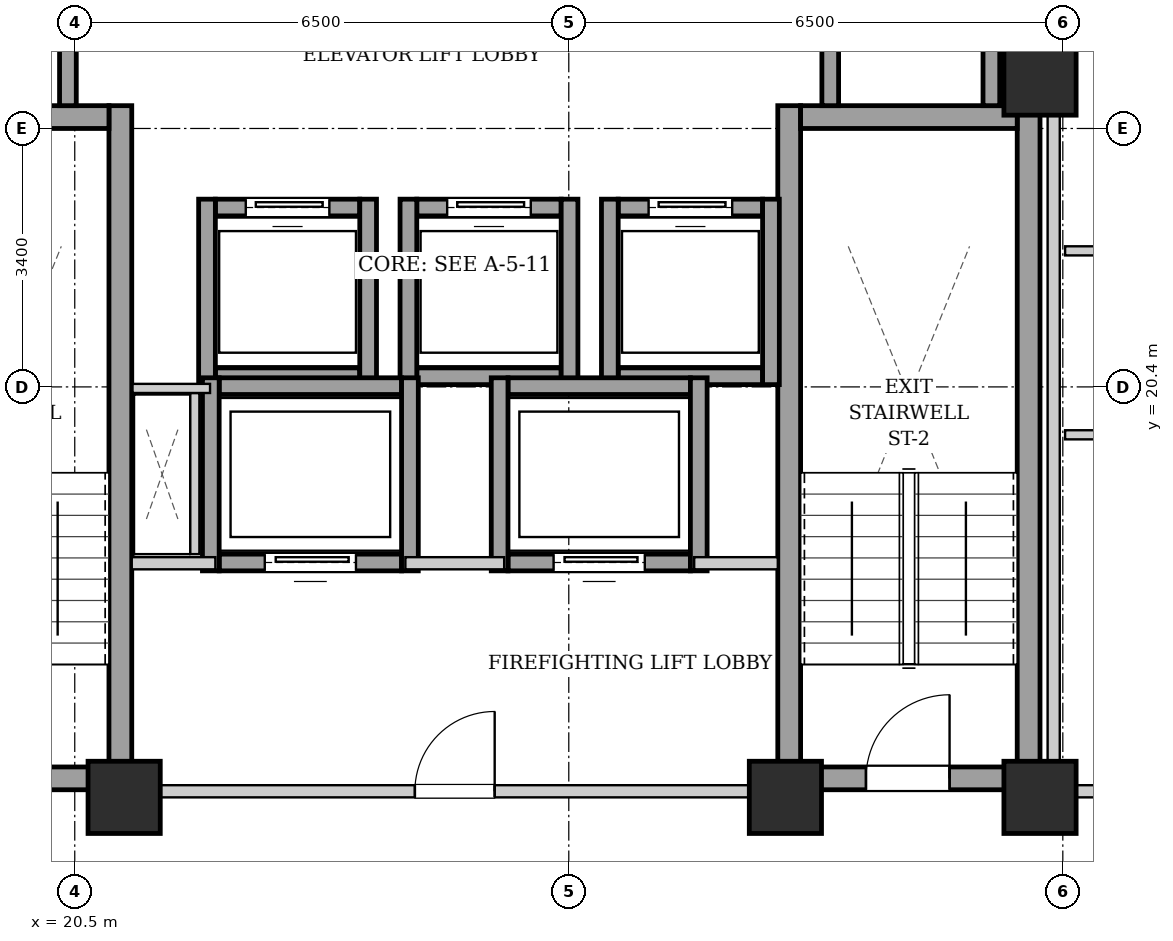
"""IFC4 building model, lengths in metres.
Left out: names, types, materials, properties, quantities, classifications, styles, units other than length and angle.
Written with IfcOpenShell. Run it as: python <this file> out.ifc"""

import sys

from ifc_helpers import new_model, si_unit, direction, frame, frame_2d, origin, origin_2d, place, context, subcontext, project, spatial, rectangle, extrude, element, fill, save


model = new_model("IFC4")
c1 = context("Model", 3, precision=1e-05, world=origin(), true_north=direction((0.0, 1.0)))
c2 = subcontext(c1, "Body", "Model", "MODEL_VIEW")
j1 = project(units=[si_unit("LENGTHUNIT", "METRE"), si_unit("PLANEANGLEUNIT", "RADIAN")], contexts=[c1])
p1 = place(None, origin())
s1 = spatial("IfcSite", under=j1, at=p1, CompositionType="ELEMENT")
p2 = place(p1, origin())
s2 = spatial("IfcBuilding", under=s1, at=p2, CompositionType="ELEMENT")
p3 = place(p2, frame((0.0, 0.0, 127.65)))
s3 = spatial("IfcBuildingStorey", under=s2, at=p3, CompositionType="ELEMENT", Elevation=127.65)
for number, where, z_axis, x_axis in (
    (1, (21.15, 15.0, 0.0), (0.0, 0.0, 1.0), (1.0, 0.0, 0.0)),
    (2, (29.85, 15.0, 0.0), (0.0, 0.0, 1.0), (1.0, 0.0, 0.0)),
    (3, (33.2, 15.0, 0.0), (0.0, 0.0, 1.0), (1.0, 0.0, 0.0)),
    (4, (33.2, 24.45, 0.0), (0.0, 0.0, 1.0), (1.0, 0.0, 0.0)),
):
    element("IfcColumn", number, at=place(p3, frame(where, z_axis=z_axis, x_axis=x_axis)), inside=s3, PredefinedType="COLUMN", context=c2, shape_type="SweptSolid", body=[
        extrude(rectangle(XDim=0.95, YDim=0.95, at=origin_2d()), origin(), (0.0, 0.0, 1.0), 3.25),
    ])
p4 = place(p3, frame((21.1, 15.1, 0.0), z_axis=(0.0, 0.0, 1.0), x_axis=(0.0, 1.0, 0.0)))
e5 = element("IfcWall", 5, at=p4, inside=s3, PredefinedType="SHEAR", context=c2, shape_type="SweptSolid", body=[
    extrude(rectangle(XDim=9.0, YDim=0.3, at=frame_2d((4.5, 0.0))), origin(), (0.0, 0.0, 1.0), 2.99),
])
p5 = place(p3, frame((18.1, 23.95, 0.0), z_axis=(0.0, 0.0, 1.0), x_axis=(1.0, 0.0, 0.0)))
e6 = element("IfcWall", 6, at=p5, inside=s3, PredefinedType="SHEAR", context=c2, shape_type="SweptSolid", body=[
    extrude(rectangle(XDim=2.85, YDim=0.3, at=frame_2d((1.425, 0.0))), origin(), (0.0, 0.0, 1.0), 2.99),
])
p6 = place(p3, frame((18.1, 15.25, 0.0), z_axis=(0.0, 0.0, 1.0), x_axis=(1.0, 0.0, 0.0)))
e7 = element("IfcWall", 7, at=p6, inside=s3, PredefinedType="SHEAR", context=c2, shape_type="SweptSolid", body=[
    extrude(rectangle(XDim=2.85, YDim=0.3, at=frame_2d((1.425, 0.0))), origin(), (0.0, 0.0, 1.0), 2.99),
])
p7 = place(p6, frame((0.86, 0.0, 0.0)))
e8 = element("IfcOpeningElement", 8, at=p7, cuts=e7, PredefinedType="OPENING", context=c2, shape_type="SweptSolid", body=[
    extrude(rectangle(XDim=1.1, YDim=2.05, at=frame_2d((0.55, 1.025))), frame((0.0, 0.16, 0.0), z_axis=(0.0, -1.0, 0.0), x_axis=(1.0, 0.0, 0.0)), (0.0, 0.0, 1.0), 0.32),
])
for number, where, z_axis, x_axis in (
    (9, (29.9, 15.1, 0.0), (0.0, 0.0, 1.0), (0.0, 1.0, 0.0)),
    (10, (33.05, 15.1, 0.0), (0.0, 0.0, 1.0), (0.0, 1.0, 0.0)),
):
    element("IfcWall", number, at=place(p3, frame(where, z_axis=z_axis, x_axis=x_axis)), inside=s3, PredefinedType="SHEAR", context=c2, shape_type="SweptSolid", body=[
        extrude(rectangle(XDim=9.0, YDim=0.3, at=frame_2d((4.5, 0.0))), origin(), (0.0, 0.0, 1.0), 2.99),
    ])
p8 = place(p3, frame((30.05, 23.95, 0.0), z_axis=(0.0, 0.0, 1.0), x_axis=(1.0, 0.0, 0.0)))
e11 = element("IfcWall", 11, at=p8, inside=s3, PredefinedType="SHEAR", context=c2, shape_type="SweptSolid", body=[
    extrude(rectangle(XDim=2.85, YDim=0.3, at=frame_2d((1.425, 0.0))), origin(), (0.0, 0.0, 1.0), 2.99),
])
p9 = place(p3, frame((30.05, 15.25, 0.0), z_axis=(0.0, 0.0, 1.0), x_axis=(1.0, 0.0, 0.0)))
e12 = element("IfcWall", 12, at=p9, inside=s3, PredefinedType="SHEAR", context=c2, shape_type="SweptSolid", body=[
    extrude(rectangle(XDim=2.85, YDim=0.3, at=frame_2d((1.425, 0.0))), origin(), (0.0, 0.0, 1.0), 2.99),
])
p10 = place(p9, frame((0.86, 0.0, 0.0)))
e13 = element("IfcOpeningElement", 13, at=p10, cuts=e12, PredefinedType="OPENING", context=c2, shape_type="SweptSolid", body=[
    extrude(rectangle(XDim=1.1, YDim=2.05, at=frame_2d((0.55, 1.025))), frame((0.0, 0.16, 0.0), z_axis=(0.0, -1.0, 0.0), x_axis=(1.0, 0.0, 0.0)), (0.0, 0.0, 1.0), 0.32),
])
p11 = place(p3, frame((22.35, 20.54, 0.0), z_axis=(0.0, 0.0, 1.0), x_axis=(1.0, 0.0, 0.0)))
e14 = element("IfcWall", 14, at=p11, inside=s3, PredefinedType="SHEAR", context=c2, shape_type="SweptSolid", body=[
    extrude(rectangle(XDim=1.9, YDim=0.22, at=frame_2d((0.95, 0.0))), origin(), (0.0, 0.0, 1.0), 2.99),
])
p12 = place(p3, frame((22.35, 22.76, 0.0), z_axis=(0.0, 0.0, 1.0), x_axis=(1.0, 0.0, 0.0)))
e15 = element("IfcWall", 15, at=p12, inside=s3, PredefinedType="SHEAR", context=c2, shape_type="SweptSolid", body=[
    extrude(rectangle(XDim=1.9, YDim=0.22, at=frame_2d((0.95, 0.0))), origin(), (0.0, 0.0, 1.0), 2.99),
])
p13 = place(p12, frame((0.4, 0.0, 0.0)))
e16 = element("IfcOpeningElement", 16, at=p13, cuts=e15, PredefinedType="OPENING", context=c2, shape_type="SweptSolid", body=[
    extrude(rectangle(XDim=1.1, YDim=2.15, at=frame_2d((0.55, 1.075))), frame((0.0, 0.12, 0.0), z_axis=(0.0, -1.0, 0.0), x_axis=(1.0, 0.0, 0.0)), (0.0, 0.0, 1.0), 0.24),
])
for number, where, z_axis, x_axis in (
    (17, (22.24, 20.43, 0.0), (0.0, 0.0, 1.0), (0.0, 1.0, 0.0)),
    (18, (24.36, 20.43, 0.0), (0.0, 0.0, 1.0), (0.0, 1.0, 0.0)),
):
    element("IfcWall", number, at=place(p3, frame(where, z_axis=z_axis, x_axis=x_axis)), inside=s3, PredefinedType="SHEAR", context=c2, shape_type="SweptSolid", body=[
        extrude(rectangle(XDim=2.44, YDim=0.22, at=frame_2d((1.22, 0.0))), origin(), (0.0, 0.0, 1.0), 2.99),
    ])
p14 = place(p3, frame((25.0, 20.54, 0.0), z_axis=(0.0, 0.0, 1.0), x_axis=(1.0, 0.0, 0.0)))
e19 = element("IfcWall", 19, at=p14, inside=s3, PredefinedType="SHEAR", context=c2, shape_type="SweptSolid", body=[
    extrude(rectangle(XDim=1.9, YDim=0.22, at=frame_2d((0.95, 0.0))), origin(), (0.0, 0.0, 1.0), 2.99),
])
p15 = place(p3, frame((25.0, 22.76, 0.0), z_axis=(0.0, 0.0, 1.0), x_axis=(1.0, 0.0, 0.0)))
e20 = element("IfcWall", 20, at=p15, inside=s3, PredefinedType="SHEAR", context=c2, shape_type="SweptSolid", body=[
    extrude(rectangle(XDim=1.9, YDim=0.22, at=frame_2d((0.95, 0.0))), origin(), (0.0, 0.0, 1.0), 2.99),
])
p16 = place(p15, frame((0.4, 0.0, 0.0)))
e21 = element("IfcOpeningElement", 21, at=p16, cuts=e20, PredefinedType="OPENING", context=c2, shape_type="SweptSolid", body=[
    extrude(rectangle(XDim=1.1, YDim=2.15, at=frame_2d((0.55, 1.075))), frame((0.0, 0.12, 0.0), z_axis=(0.0, -1.0, 0.0), x_axis=(1.0, 0.0, 0.0)), (0.0, 0.0, 1.0), 0.24),
])
for number, where, z_axis, x_axis in (
    (22, (24.89, 20.43, 0.0), (0.0, 0.0, 1.0), (0.0, 1.0, 0.0)),
    (23, (27.01, 20.43, 0.0), (0.0, 0.0, 1.0), (0.0, 1.0, 0.0)),
):
    element("IfcWall", number, at=place(p3, frame(where, z_axis=z_axis, x_axis=x_axis)), inside=s3, PredefinedType="SHEAR", context=c2, shape_type="SweptSolid", body=[
        extrude(rectangle(XDim=2.44, YDim=0.22, at=frame_2d((1.22, 0.0))), origin(), (0.0, 0.0, 1.0), 2.99),
    ])
p17 = place(p3, frame((27.65, 20.54, 0.0), z_axis=(0.0, 0.0, 1.0), x_axis=(1.0, 0.0, 0.0)))
e24 = element("IfcWall", 24, at=p17, inside=s3, PredefinedType="SHEAR", context=c2, shape_type="SweptSolid", body=[
    extrude(rectangle(XDim=1.9, YDim=0.22, at=frame_2d((0.95, 0.0))), origin(), (0.0, 0.0, 1.0), 2.99),
])
p18 = place(p3, frame((27.65, 22.76, 0.0), z_axis=(0.0, 0.0, 1.0), x_axis=(1.0, 0.0, 0.0)))
e25 = element("IfcWall", 25, at=p18, inside=s3, PredefinedType="SHEAR", context=c2, shape_type="SweptSolid", body=[
    extrude(rectangle(XDim=1.9, YDim=0.22, at=frame_2d((0.95, 0.0))), origin(), (0.0, 0.0, 1.0), 2.99),
])
p19 = place(p18, frame((0.4, 0.0, 0.0)))
e26 = element("IfcOpeningElement", 26, at=p19, cuts=e25, PredefinedType="OPENING", context=c2, shape_type="SweptSolid", body=[
    extrude(rectangle(XDim=1.1, YDim=2.15, at=frame_2d((0.55, 1.075))), frame((0.0, 0.12, 0.0), z_axis=(0.0, -1.0, 0.0), x_axis=(1.0, 0.0, 0.0)), (0.0, 0.0, 1.0), 0.24),
])
for number, where, z_axis, x_axis in (
    (27, (27.54, 20.43, 0.0), (0.0, 0.0, 1.0), (0.0, 1.0, 0.0)),
    (28, (29.66, 20.43, 0.0), (0.0, 0.0, 1.0), (0.0, 1.0, 0.0)),
):
    element("IfcWall", number, at=place(p3, frame(where, z_axis=z_axis, x_axis=x_axis)), inside=s3, PredefinedType="SHEAR", context=c2, shape_type="SweptSolid", body=[
        extrude(rectangle(XDim=2.44, YDim=0.22, at=frame_2d((1.22, 0.0))), origin(), (0.0, 0.0, 1.0), 2.99),
    ])
p20 = place(p3, frame((20.41, 24.1, 0.0), z_axis=(0.0, 0.0, 1.0), x_axis=(0.0, 1.0, 0.0)))
e29 = element("IfcWall", 29, at=p20, inside=s3, PredefinedType="SHEAR", context=c2, shape_type="SweptSolid", body=[
    extrude(rectangle(XDim=1.96, YDim=0.22, at=frame_2d((0.98, 0.0))), origin(), (0.0, 0.0, 1.0), 2.99),
])
for number, where, z_axis, x_axis in (
    (30, (30.44, 24.1, 0.0), (0.0, 0.0, 1.0), (0.0, 1.0, 0.0)),
    (31, (32.56, 24.1, 0.0), (0.0, 0.0, 1.0), (0.0, 1.0, 0.0)),
):
    element("IfcWall", number, at=place(p3, frame(where, z_axis=z_axis, x_axis=x_axis)), inside=s3, PredefinedType="SHEAR", context=c2, shape_type="SweptSolid", body=[
        extrude(rectangle(XDim=2.07, YDim=0.22, at=frame_2d((1.035, 0.0))), origin(), (0.0, 0.0, 1.0), 2.99),
    ])
p21 = place(p3, frame((22.4, 18.09, 0.0), z_axis=(0.0, 0.0, 1.0), x_axis=(1.0, 0.0, 0.0)))
e32 = element("IfcWall", 32, at=p21, inside=s3, PredefinedType="SHEAR", context=c2, shape_type="SweptSolid", body=[
    extrude(rectangle(XDim=2.4, YDim=0.22, at=frame_2d((1.2, 0.0))), origin(), (0.0, 0.0, 1.0), 2.99),
])
p22 = place(p21, frame((0.6, 0.0, 0.0)))
e33 = element("IfcOpeningElement", 33, at=p22, cuts=e32, PredefinedType="OPENING", context=c2, shape_type="SweptSolid", body=[
    extrude(rectangle(XDim=1.2, YDim=2.15, at=frame_2d((0.6, 1.075))), frame((0.0, 0.12, 0.0), z_axis=(0.0, -1.0, 0.0), x_axis=(1.0, 0.0, 0.0)), (0.0, 0.0, 1.0), 0.24),
])
p23 = place(p3, frame((22.4, 20.41, 0.0), z_axis=(0.0, 0.0, 1.0), x_axis=(1.0, 0.0, 0.0)))
e34 = element("IfcWall", 34, at=p23, inside=s3, PredefinedType="SHEAR", context=c2, shape_type="SweptSolid", body=[
    extrude(rectangle(XDim=2.4, YDim=0.22, at=frame_2d((1.2, 0.0))), origin(), (0.0, 0.0, 1.0), 2.99),
])
for number, where, z_axis, x_axis in (
    (35, (22.29, 17.98, 0.0), (0.0, 0.0, 1.0), (0.0, 1.0, 0.0)),
    (36, (24.91, 17.98, 0.0), (0.0, 0.0, 1.0), (0.0, 1.0, 0.0)),
):
    element("IfcWall", number, at=place(p3, frame(where, z_axis=z_axis, x_axis=x_axis)), inside=s3, PredefinedType="SHEAR", context=c2, shape_type="SweptSolid", body=[
        extrude(rectangle(XDim=2.54, YDim=0.22, at=frame_2d((1.27, 0.0))), origin(), (0.0, 0.0, 1.0), 2.99),
    ])
p24 = place(p3, frame((26.2, 18.09, 0.0), z_axis=(0.0, 0.0, 1.0), x_axis=(1.0, 0.0, 0.0)))
e37 = element("IfcWall", 37, at=p24, inside=s3, PredefinedType="SHEAR", context=c2, shape_type="SweptSolid", body=[
    extrude(rectangle(XDim=2.4, YDim=0.22, at=frame_2d((1.2, 0.0))), origin(), (0.0, 0.0, 1.0), 2.99),
])
p25 = place(p24, frame((0.6, 0.0, 0.0)))
e38 = element("IfcOpeningElement", 38, at=p25, cuts=e37, PredefinedType="OPENING", context=c2, shape_type="SweptSolid", body=[
    extrude(rectangle(XDim=1.2, YDim=2.15, at=frame_2d((0.6, 1.075))), frame((0.0, 0.12, 0.0), z_axis=(0.0, -1.0, 0.0), x_axis=(1.0, 0.0, 0.0)), (0.0, 0.0, 1.0), 0.24),
])
p26 = place(p3, frame((26.2, 20.41, 0.0), z_axis=(0.0, 0.0, 1.0), x_axis=(1.0, 0.0, 0.0)))
e39 = element("IfcWall", 39, at=p26, inside=s3, PredefinedType="SHEAR", context=c2, shape_type="SweptSolid", body=[
    extrude(rectangle(XDim=2.4, YDim=0.22, at=frame_2d((1.2, 0.0))), origin(), (0.0, 0.0, 1.0), 2.99),
])
for number, where, z_axis, x_axis in (
    (40, (26.09, 17.98, 0.0), (0.0, 0.0, 1.0), (0.0, 1.0, 0.0)),
    (41, (28.71, 17.98, 0.0), (0.0, 0.0, 1.0), (0.0, 1.0, 0.0)),
):
    element("IfcWall", number, at=place(p3, frame(where, z_axis=z_axis, x_axis=x_axis)), inside=s3, PredefinedType="SHEAR", context=c2, shape_type="SweptSolid", body=[
        extrude(rectangle(XDim=2.54, YDim=0.22, at=frame_2d((1.27, 0.0))), origin(), (0.0, 0.0, 1.0), 2.99),
    ])
p27 = place(p3, frame((21.25, 15.08, 0.0), z_axis=(0.0, 0.0, 1.0), x_axis=(1.0, 0.0, 0.0)))
e42 = element("IfcWall", 42, at=p27, inside=s3, PredefinedType="PARTITIONING", context=c2, shape_type="SweptSolid", body=[
    extrude(rectangle(XDim=8.5, YDim=0.16, at=frame_2d((4.25, 0.0))), origin(), (0.0, 0.0, 1.0), 2.426),
])
p28 = place(p27, frame((3.725, 0.0, 0.0)))
e43 = element("IfcOpeningElement", 43, at=p28, cuts=e42, PredefinedType="OPENING", context=c2, shape_type="SweptSolid", body=[
    extrude(rectangle(XDim=1.05, YDim=2.05, at=frame_2d((0.525, 1.025))), frame((0.0, 0.09, 0.0), z_axis=(0.0, -1.0, 0.0), x_axis=(1.0, 0.0, 0.0)), (0.0, 0.0, 1.0), 0.18),
])
p29 = place(p3, frame((21.25, 18.08, 0.0), z_axis=(0.0, 0.0, 1.0), x_axis=(1.0, 0.0, 0.0)))
e44 = element("IfcWall", 44, at=p29, inside=s3, PredefinedType="PARTITIONING", context=c2, shape_type="SweptSolid", body=[
    extrude(rectangle(XDim=1.1, YDim=0.16, at=frame_2d((0.55, 0.0))), origin(), (0.0, 0.0, 1.0), 2.99),
])
p30 = place(p3, frame((24.85, 18.08, 0.0), z_axis=(0.0, 0.0, 1.0), x_axis=(1.0, 0.0, 0.0)))
e45 = element("IfcWall", 45, at=p30, inside=s3, PredefinedType="PARTITIONING", context=c2, shape_type="SweptSolid", body=[
    extrude(rectangle(XDim=1.3, YDim=0.16, at=frame_2d((0.65, 0.0))), origin(), (0.0, 0.0, 1.0), 2.99),
])
p31 = place(p3, frame((28.65, 18.08, 0.0), z_axis=(0.0, 0.0, 1.0), x_axis=(1.0, 0.0, 0.0)))
e46 = element("IfcWall", 46, at=p31, inside=s3, PredefinedType="PARTITIONING", context=c2, shape_type="SweptSolid", body=[
    extrude(rectangle(XDim=1.1, YDim=0.16, at=frame_2d((0.55, 0.0))), origin(), (0.0, 0.0, 1.0), 2.99),
])
p32 = place(p3, frame((33.12, 24.12, 0.0), z_axis=(0.0, 0.0, 1.0), x_axis=(0.0, 1.0, 0.0)))
e47 = element("IfcWall", 47, at=p32, inside=s3, PredefinedType="PARTITIONING", context=c2, shape_type="SweptSolid", body=[
    extrude(rectangle(XDim=4.76, YDim=0.16, at=frame_2d((2.38, 0.0))), origin(), (0.0, 0.0, 1.0), 2.325),
])
p33 = place(p3, frame((22.08, 18.2, 0.0), z_axis=(0.0, 0.0, 1.0), x_axis=(0.0, 1.0, 0.0)))
e48 = element("IfcWall", 48, at=p33, inside=s3, PredefinedType="PARTITIONING", context=c2, shape_type="SweptSolid", body=[
    extrude(rectangle(XDim=2.12, YDim=0.12, at=frame_2d((1.06, 0.0))), origin(), (0.0, 0.0, 1.0), 2.99),
])
p34 = place(p3, frame((22.28, 20.38, 0.0), z_axis=(0.0, 0.0, 1.0), x_axis=(-1.0, 0.0, 0.0)))
e49 = element("IfcWall", 49, at=p34, inside=s3, PredefinedType="PARTITIONING", context=c2, shape_type="SweptSolid", body=[
    extrude(rectangle(XDim=1.02, YDim=0.12, at=frame_2d((0.51, 0.0))), origin(), (0.0, 0.0, 1.0), 2.99),
])
p35 = place(p3, frame((33.38, 15.08, 0.0), z_axis=(0.0, 0.0, 1.0), x_axis=(1.0, 0.0, 0.0)))
e50 = element("IfcWall", 50, at=p35, inside=s3, PredefinedType="PARTITIONING", context=c2, shape_type="SweptSolid", body=[
    extrude(rectangle(XDim=6.64, YDim=0.16, at=frame_2d((3.32, 0.0))), origin(), (0.0, 0.0, 1.0), 2.426),
])
p36 = place(p35, frame((0.9, 0.0, 0.0)))
e51 = element("IfcOpeningElement", 51, at=p36, cuts=e50, PredefinedType="OPENING", context=c2, shape_type="SweptSolid", body=[
    extrude(rectangle(XDim=0.95, YDim=2.1, at=frame_2d((0.475, 1.05))), frame((0.0, 0.09, 0.0), z_axis=(0.0, -1.0, 0.0), x_axis=(1.0, 0.0, 0.0)), (0.0, 0.0, 1.0), 0.18),
])
p37 = place(p3, frame((33.53, 22.19, 0.0), z_axis=(0.0, 0.0, 1.0), x_axis=(1.0, 0.0, 0.0)))
e52 = element("IfcWall", 52, at=p37, inside=s3, PredefinedType="PARTITIONING", context=c2, shape_type="SweptSolid", body=[
    extrude(rectangle(XDim=2.45, YDim=0.12, at=frame_2d((1.225, 0.0))), origin(), (0.0, 0.0, 1.0), 2.99),
])
p38 = place(p3, frame((33.53, 19.77, 0.0), z_axis=(0.0, 0.0, 1.0), x_axis=(1.0, 0.0, 0.0)))
e53 = element("IfcWall", 53, at=p38, inside=s3, PredefinedType="PARTITIONING", context=c2, shape_type="SweptSolid", body=[
    extrude(rectangle(XDim=2.45, YDim=0.12, at=frame_2d((1.225, 0.0))), origin(), (0.0, 0.0, 1.0), 2.99),
])
p39 = place(p38, frame((0.795, 0.0, 0.0)))
e54 = element("IfcOpeningElement", 54, at=p39, cuts=e53, PredefinedType="OPENING", context=c2, shape_type="SweptSolid", body=[
    extrude(rectangle(XDim=0.86, YDim=2.05, at=frame_2d((0.43, 1.025))), frame((0.0, 0.07, 0.0), z_axis=(0.0, -1.0, 0.0), x_axis=(1.0, 0.0, 0.0)), (0.0, 0.0, 1.0), 0.14),
])
p40 = place(p3, frame((33.38, 15.02, 0.0), z_axis=(0.0, 0.0, 1.0), x_axis=(0.0, 1.0, 0.0)))
e55 = element("IfcWall", 55, at=p40, inside=s3, PredefinedType="PARTITIONING", context=c2, shape_type="SweptSolid", body=[
    extrude(rectangle(XDim=13.98, YDim=0.16, at=frame_2d((6.99, 0.0))), origin(), (0.0, 0.0, 1.0), 2.325),
])
p41 = place(p10, origin())
e56 = element("IfcDoor", 56, at=p41, inside=s3, OperationType="SINGLE_SWING_RIGHT", PredefinedType="DOOR", context=c2, shape_type="SweptSolid", body=[
    extrude(rectangle(XDim=1.1, YDim=2.05, at=frame_2d((0.55, 1.025))), frame((0.0, 0.025, 0.0), z_axis=(0.0, -1.0, 0.0), x_axis=(1.0, 0.0, 0.0)), (0.0, 0.0, 1.0), 0.05),
])
fill(e13, e56)
p42 = place(p13, origin())
e57 = element("IfcDoor", 57, at=p42, inside=s3, OperationType="SLIDING_TO_LEFT", PredefinedType="DOOR", context=c2, shape_type="SweptSolid", body=[
    extrude(rectangle(XDim=1.1, YDim=2.15, at=frame_2d((0.55, 1.075))), frame((0.0, 0.025, 0.0), z_axis=(0.0, -1.0, 0.0), x_axis=(1.0, 0.0, 0.0)), (0.0, 0.0, 1.0), 0.05),
])
fill(e16, e57)
p43 = place(p16, origin())
e58 = element("IfcDoor", 58, at=p43, inside=s3, OperationType="SLIDING_TO_LEFT", PredefinedType="DOOR", context=c2, shape_type="SweptSolid", body=[
    extrude(rectangle(XDim=1.1, YDim=2.15, at=frame_2d((0.55, 1.075))), frame((0.0, 0.025, 0.0), z_axis=(0.0, -1.0, 0.0), x_axis=(1.0, 0.0, 0.0)), (0.0, 0.0, 1.0), 0.05),
])
fill(e21, e58)
p44 = place(p19, origin())
e59 = element("IfcDoor", 59, at=p44, inside=s3, OperationType="SLIDING_TO_LEFT", PredefinedType="DOOR", context=c2, shape_type="SweptSolid", body=[
    extrude(rectangle(XDim=1.1, YDim=2.15, at=frame_2d((0.55, 1.075))), frame((0.0, 0.025, 0.0), z_axis=(0.0, -1.0, 0.0), x_axis=(1.0, 0.0, 0.0)), (0.0, 0.0, 1.0), 0.05),
])
fill(e26, e59)
p45 = place(p22, origin())
e60 = element("IfcDoor", 60, at=p45, inside=s3, OperationType="SLIDING_TO_LEFT", PredefinedType="DOOR", context=c2, shape_type="SweptSolid", body=[
    extrude(rectangle(XDim=1.2, YDim=2.15, at=frame_2d((0.6, 1.075))), frame((0.0, 0.025, 0.0), z_axis=(0.0, -1.0, 0.0), x_axis=(1.0, 0.0, 0.0)), (0.0, 0.0, 1.0), 0.05),
])
fill(e33, e60)
p46 = place(p25, origin())
e61 = element("IfcDoor", 61, at=p46, inside=s3, OperationType="SLIDING_TO_LEFT", PredefinedType="DOOR", context=c2, shape_type="SweptSolid", body=[
    extrude(rectangle(XDim=1.2, YDim=2.15, at=frame_2d((0.6, 1.075))), frame((0.0, 0.025, 0.0), z_axis=(0.0, -1.0, 0.0), x_axis=(1.0, 0.0, 0.0)), (0.0, 0.0, 1.0), 0.05),
])
fill(e38, e61)
p47 = place(p28, origin())
e62 = element("IfcDoor", 62, at=p47, inside=s3, OperationType="SINGLE_SWING_RIGHT", PredefinedType="DOOR", context=c2, shape_type="SweptSolid", body=[
    extrude(rectangle(XDim=1.05, YDim=2.05, at=frame_2d((0.525, 1.025))), frame((0.0, 0.025, 0.0), z_axis=(0.0, -1.0, 0.0), x_axis=(1.0, 0.0, 0.0)), (0.0, 0.0, 1.0), 0.05),
])
fill(e43, e62)
save(model, sys.argv[1])
